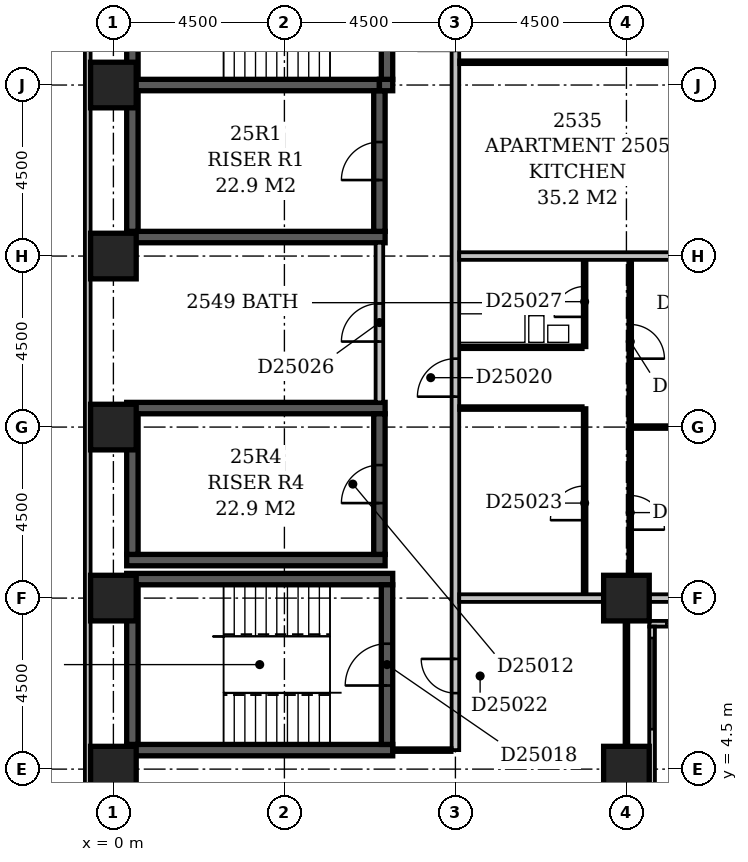
"""IFC4 building model, lengths in metres.
Left out: names, types, materials, properties, quantities, classifications, styles, units other than length and angle.
Written with IfcOpenShell. Run it as: python <this file> out.ifc"""

import sys

from ifc_helpers import new_model, si_unit, direction, frame, frame_2d, origin, origin_2d, place, context, subcontext, project, spatial, rectangle, extrude, element, fill, save


model = new_model("IFC4")
c1 = context("Model", 3, precision=1e-05, world=origin(), true_north=direction((0.0, 1.0)))
c2 = subcontext(c1, "Body", "Model", "MODEL_VIEW")
j1 = project(units=[si_unit("LENGTHUNIT", "METRE"), si_unit("PLANEANGLEUNIT", "RADIAN")], contexts=[c1])
p1 = place(None, origin())
s1 = spatial("IfcSite", under=j1, at=p1, CompositionType="ELEMENT")
p2 = place(p1, origin())
s2 = spatial("IfcBuilding", under=s1, at=p2, CompositionType="ELEMENT")
p3 = place(p2, frame((0.0, 0.0, 101.0)))
s3 = spatial("IfcBuildingStorey", under=s2, at=p3, CompositionType="ELEMENT", Elevation=101.0)
for number, where, z_axis, x_axis in (
    (1, (0.35, 5.0, -0.3), (0.0, 0.0, 1.0), (1.0, 0.0, 0.0)),
    (2, (0.35, 9.5, -0.3), (0.0, 0.0, 1.0), (1.0, 0.0, 0.0)),
):
    element("IfcWall", number, at=place(p3, frame(where, z_axis=z_axis, x_axis=x_axis)), inside=s3, PredefinedType="SHEAR", context=c2, shape_type="SweptSolid", body=[
        extrude(rectangle(XDim=7.0, YDim=0.3, at=frame_2d((3.5, 0.0))), origin(), (0.0, 0.0, 1.0), 3.6),
    ])
for number, where, z_axis, x_axis in (
    (3, (0.35, 10.0, -0.3), (0.0, 0.0, 1.0), (1.0, 0.0, 0.0)),
    (4, (0.35, 14.0, -0.3), (0.0, 0.0, 1.0), (1.0, 0.0, 0.0)),
    (5, (0.35, 18.5, -0.3), (0.0, 0.0, 1.0), (1.0, 0.0, 0.0)),
):
    element("IfcWall", number, at=place(p3, frame(where, z_axis=z_axis, x_axis=x_axis)), inside=s3, PredefinedType="SHEAR", context=c2, shape_type="SweptSolid", body=[
        extrude(rectangle(XDim=6.8, YDim=0.3, at=frame_2d((3.4, 0.0))), origin(), (0.0, 0.0, 1.0), 3.6),
    ])
p4 = place(p3, frame((0.35, 22.5, -0.3), z_axis=(0.0, 0.0, 1.0), x_axis=(1.0, 0.0, 0.0)))
e6 = element("IfcWall", 6, at=p4, inside=s3, PredefinedType="SHEAR", context=c2, shape_type="SweptSolid", body=[
    extrude(rectangle(XDim=6.65, YDim=0.3, at=frame_2d((3.325, 0.0))), origin(), (0.0, 0.0, 1.0), 3.6),
])
p5 = place(p3, frame((0.5, 5.15, -0.3), z_axis=(0.0, 0.0, 1.0), x_axis=(0.0, 1.0, 0.0)))
e7 = element("IfcWall", 7, at=p5, inside=s3, PredefinedType="SHEAR", context=c2, shape_type="SweptSolid", body=[
    extrude(rectangle(XDim=4.2, YDim=0.3, at=frame_2d((2.1, 0.0))), origin(), (0.0, 0.0, 1.0), 3.6),
])
for number, where, z_axis, x_axis in (
    (8, (0.5, 10.15, -0.3), (0.0, 0.0, 1.0), (0.0, 1.0, 0.0)),
    (9, (0.5, 18.65, -0.3), (0.0, 0.0, 1.0), (0.0, 1.0, 0.0)),
):
    element("IfcWall", number, at=place(p3, frame(where, z_axis=z_axis, x_axis=x_axis)), inside=s3, PredefinedType="SHEAR", context=c2, shape_type="SweptSolid", body=[
        extrude(rectangle(XDim=3.7, YDim=0.3, at=frame_2d((1.85, 0.0))), origin(), (0.0, 0.0, 1.0), 3.6),
    ])
p6 = place(p3, frame((0.5, 22.65, -0.3), z_axis=(0.0, 0.0, 1.0), x_axis=(0.0, 1.0, 0.0)))
e10 = element("IfcWall", 10, at=p6, inside=s3, PredefinedType="SHEAR", context=c2, shape_type="SweptSolid", body=[
    extrude(rectangle(XDim=4.2, YDim=0.3, at=frame_2d((2.1, 0.0))), origin(), (0.0, 0.0, 1.0), 3.6),
])
p7 = place(p3, frame((7.0, 10.15, -0.3), z_axis=(0.0, 0.0, 1.0), x_axis=(0.0, 1.0, 0.0)))
e11 = element("IfcWall", 11, at=p7, inside=s3, PredefinedType="SHEAR", context=c2, shape_type="SweptSolid", body=[
    extrude(rectangle(XDim=3.7, YDim=0.3, at=frame_2d((1.85, 0.0))), origin(), (0.0, 0.0, 1.0), 3.6),
])
p8 = place(p7, frame((1.35, 0.0, 0.3)))
e12 = element("IfcOpeningElement", 12, at=p8, cuts=e11, PredefinedType="OPENING", context=c2, shape_type="SweptSolid", body=[
    extrude(rectangle(XDim=1.0, YDim=2.1, at=frame_2d((0.5, 1.05))), frame((0.0, 0.162, 0.0), z_axis=(0.0, -1.0, 0.0), x_axis=(1.0, 0.0, 0.0)), (0.0, 0.0, 1.0), 0.324),
])
p9 = place(p3, frame((7.0, 18.65, -0.3), z_axis=(0.0, 0.0, 1.0), x_axis=(0.0, 1.0, 0.0)))
e13 = element("IfcWall", 13, at=p9, inside=s3, PredefinedType="SHEAR", context=c2, shape_type="SweptSolid", body=[
    extrude(rectangle(XDim=3.7, YDim=0.3, at=frame_2d((1.85, 0.0))), origin(), (0.0, 0.0, 1.0), 3.6),
])
p10 = place(p9, frame((1.35, 0.0, 0.3)))
e14 = element("IfcOpeningElement", 14, at=p10, cuts=e13, PredefinedType="OPENING", context=c2, shape_type="SweptSolid", body=[
    extrude(rectangle(XDim=1.0, YDim=2.1, at=frame_2d((0.5, 1.05))), frame((0.0, 0.162, 0.0), z_axis=(0.0, -1.0, 0.0), x_axis=(1.0, 0.0, 0.0)), (0.0, 0.0, 1.0), 0.324),
])
p11 = place(p3, frame((7.0, 22.5, -0.3), z_axis=(0.0, 0.0, 1.0), x_axis=(1.0, 0.0, 0.0)))
e15 = element("IfcWall", 15, at=p11, inside=s3, PredefinedType="SHEAR", context=c2, shape_type="SweptSolid", body=[
    extrude(rectangle(XDim=0.35, YDim=0.3, at=frame_2d((0.175, 0.0))), origin(), (0.0, 0.0, 1.0), 3.6),
])
p12 = place(p3, frame((7.2, 5.15, -0.3), z_axis=(0.0, 0.0, 1.0), x_axis=(0.0, 1.0, 0.0)))
e16 = element("IfcWall", 16, at=p12, inside=s3, PredefinedType="SHEAR", context=c2, shape_type="SweptSolid", body=[
    extrude(rectangle(XDim=4.2, YDim=0.3, at=frame_2d((2.1, 0.0))), origin(), (0.0, 0.0, 1.0), 3.6),
])
p13 = place(p12, frame((1.55, 0.0, 0.3)))
e17 = element("IfcOpeningElement", 17, at=p13, cuts=e16, PredefinedType="OPENING", context=c2, shape_type="SweptSolid", body=[
    extrude(rectangle(XDim=1.1, YDim=2.1, at=frame_2d((0.55, 1.05))), frame((0.0, 0.162, 0.0), z_axis=(0.0, -1.0, 0.0), x_axis=(1.0, 0.0, 0.0)), (0.0, 0.0, 1.0), 0.324),
])
p14 = place(p3, frame((7.2, 22.65, -0.3), z_axis=(0.0, 0.0, 1.0), x_axis=(0.0, 1.0, 0.0)))
e18 = element("IfcWall", 18, at=p14, inside=s3, PredefinedType="SHEAR", context=c2, shape_type="SweptSolid", body=[
    extrude(rectangle(XDim=4.2, YDim=0.3, at=frame_2d((2.1, 0.0))), origin(), (0.0, 0.0, 1.0), 3.6),
])
p15 = place(p14, frame((0.8, 0.0, 0.3)))
e19 = element("IfcOpeningElement", 19, at=p15, cuts=e18, PredefinedType="OPENING", context=c2, shape_type="SweptSolid", body=[
    extrude(rectangle(XDim=1.1, YDim=2.1, at=frame_2d((0.55, 1.05))), frame((0.0, 0.162, 0.0), z_axis=(0.0, -1.0, 0.0), x_axis=(1.0, 0.0, 0.0)), (0.0, 0.0, 1.0), 0.324),
])
for number, where, z_axis, x_axis in (
    (20, (0.0, 4.5, -0.3), (0.0, 0.0, 1.0), (1.0, 0.0, 0.0)),
    (21, (13.5, 4.5, -0.3), (0.0, 0.0, 1.0), (1.0, 0.0, 0.0)),
    (22, (0.0, 9.0, -0.3), (0.0, 0.0, 1.0), (1.0, 0.0, 0.0)),
    (23, (13.5, 9.0, -0.3), (0.0, 0.0, 1.0), (1.0, 0.0, 0.0)),
    (24, (0.0, 13.5, -0.3), (0.0, 0.0, 1.0), (1.0, 0.0, 0.0)),
    (25, (0.0, 18.0, -0.3), (0.0, 0.0, 1.0), (1.0, 0.0, 0.0)),
    (26, (0.0, 22.5, -0.3), (0.0, 0.0, 1.0), (1.0, 0.0, 0.0)),
):
    element("IfcColumn", number, at=place(p3, frame(where, z_axis=z_axis, x_axis=x_axis)), inside=s3, PredefinedType="COLUMN", context=c2, shape_type="SweptSolid", body=[
        extrude(rectangle(XDim=1.2, YDim=1.2, at=origin_2d()), origin(), (0.0, 0.0, 1.0), 3.6),
    ])
p16 = place(p3, frame((14.175, 3.9, 0.0), z_axis=(0.0, 0.0, 1.0), x_axis=(0.0, 1.0, 0.0)))
e27 = element("IfcWall", 27, at=p16, inside=s3, PredefinedType="STANDARD", context=c2, shape_type="SweptSolid", body=[
    extrude(rectangle(XDim=4.35, YDim=0.15, at=frame_2d((2.175, 0.0))), origin(), (0.0, 0.0, 1.0), 2.7),
])
p17 = place(p16, frame((1.65, 0.0, 0.6)))
e28 = element("IfcOpeningElement", 28, at=p17, cuts=e27, PredefinedType="OPENING", context=c2, shape_type="SweptSolid", body=[
    extrude(rectangle(XDim=2.4, YDim=1.8, at=frame_2d((1.2, 0.9))), frame((0.0, 0.087, 0.0), z_axis=(0.0, -1.0, 0.0), x_axis=(1.0, 0.0, 0.0)), (0.0, 0.0, 1.0), 0.174),
])
p18 = place(p3, frame((14.1, 8.325, 0.0), z_axis=(0.0, 0.0, 1.0), x_axis=(1.0, 0.0, 0.0)))
e29 = element("IfcWall", 29, at=p18, inside=s3, PredefinedType="STANDARD", context=c2, shape_type="SweptSolid", body=[
    extrude(rectangle(XDim=4.65, YDim=0.15, at=frame_2d((2.325, 0.0))), origin(), (0.0, 0.0, 1.0), 2.7),
])
p19 = place(p18, frame((0.45, 0.0, 0.6)))
e30 = element("IfcOpeningElement", 30, at=p19, cuts=e29, PredefinedType="OPENING", context=c2, shape_type="SweptSolid", body=[
    extrude(rectangle(XDim=2.4, YDim=1.8, at=frame_2d((1.2, 0.9))), frame((0.0, 0.087, 0.0), z_axis=(0.0, -1.0, 0.0), x_axis=(1.0, 0.0, 0.0)), (0.0, 0.0, 1.0), 0.174),
])
p20 = place(p3, frame((-0.675, 59.1, 0.0), z_axis=(0.0, 0.0, 1.0), x_axis=(0.0, -1.0, 0.0)))
e31 = element("IfcWall", 31, at=p20, inside=s3, PredefinedType="STANDARD", context=c2, shape_type="SweptSolid", body=[
    extrude(rectangle(XDim=55.35, YDim=0.15, at=frame_2d((27.675, 0.0))), origin(), (0.0, 0.0, 1.0), 2.7),
])
p21 = place(p20, frame((10.65, 0.0, 0.6)))
e32 = element("IfcOpeningElement", 32, at=p21, cuts=e31, PredefinedType="OPENING", context=c2, shape_type="SweptSolid", body=[
    extrude(rectangle(XDim=2.4, YDim=1.8, at=frame_2d((1.2, 0.9))), frame((0.0, 0.087, 0.0), z_axis=(0.0, -1.0, 0.0), x_axis=(1.0, 0.0, 0.0)), (0.0, 0.0, 1.0), 0.174),
])
p22 = place(p20, frame((15.15, 0.0, 0.6)))
e33 = element("IfcOpeningElement", 33, at=p22, cuts=e31, PredefinedType="OPENING", context=c2, shape_type="SweptSolid", body=[
    extrude(rectangle(XDim=2.4, YDim=1.8, at=frame_2d((1.2, 0.9))), frame((0.0, 0.087, 0.0), z_axis=(0.0, -1.0, 0.0), x_axis=(1.0, 0.0, 0.0)), (0.0, 0.0, 1.0), 0.174),
])
p23 = place(p20, frame((19.476, 0.0, 0.6)))
e34 = element("IfcOpeningElement", 34, at=p23, cuts=e31, PredefinedType="OPENING", context=c2, shape_type="SweptSolid", body=[
    extrude(rectangle(XDim=2.4, YDim=1.8, at=frame_2d((1.2, 0.9))), frame((0.0, 0.087, 0.0), z_axis=(0.0, -1.0, 0.0), x_axis=(1.0, 0.0, 0.0)), (0.0, 0.0, 1.0), 0.174),
])
p24 = place(p3, frame((0.0, 4.4, 0.0), z_axis=(0.0, 0.0, 1.0), x_axis=(0.0, 1.0, 0.0)))
e35 = element("IfcWall", 35, at=p24, inside=s3, PredefinedType="PARTITIONING", context=c2, shape_type="SweptSolid", body=[
    extrude(rectangle(XDim=0.7, YDim=0.1, at=frame_2d((0.35, 0.0))), origin(), (0.0, 0.0, 1.0), 2.7),
])
p25 = place(p3, frame((7.349, 5.0, 0.0), z_axis=(0.0, 0.0, 1.0), x_axis=(1.0, 0.0, 0.0)))
e36 = element("IfcWall", 36, at=p25, inside=s3, PredefinedType="PARTITIONING", context=c2, shape_type="SweptSolid", body=[
    extrude(rectangle(XDim=1.551, YDim=0.1, at=frame_2d((0.775, 0.0))), origin(), (0.0, 0.0, 1.0), 3.3),
])
p26 = place(p3, frame((9.0, 5.0, 0.0), z_axis=(0.0, 0.0, 1.0), x_axis=(0.0, 1.0, 0.0)))
e37 = element("IfcWall", 37, at=p26, inside=s3, PredefinedType="PARTITIONING", context=c2, shape_type="SweptSolid", body=[
    extrude(rectangle(XDim=44.5, YDim=0.2, at=frame_2d((22.25, 0.0))), origin(), (0.0, 0.0, 1.0), 3.3),
])
p27 = place(p26, frame((18.4, 0.0, 0.0)))
e38 = element("IfcOpeningElement", 38, at=p27, cuts=e37, PredefinedType="OPENING", context=c2, shape_type="SweptSolid", body=[
    extrude(rectangle(XDim=1.0, YDim=2.1, at=frame_2d((0.5, 1.05))), frame((0.0, 0.112, 0.0), z_axis=(0.0, -1.0, 0.0), x_axis=(1.0, 0.0, 0.0)), (0.0, 0.0, 1.0), 0.224),
])
p28 = place(p26, frame((9.3, 0.0, 0.0)))
e39 = element("IfcOpeningElement", 39, at=p28, cuts=e37, PredefinedType="OPENING", context=c2, shape_type="SweptSolid", body=[
    extrude(rectangle(XDim=1.0, YDim=2.1, at=frame_2d((0.5, 1.05))), frame((0.0, 0.112, 0.0), z_axis=(0.0, -1.0, 0.0), x_axis=(1.0, 0.0, 0.0)), (0.0, 0.0, 1.0), 0.224),
])
p29 = place(p26, frame((37.25, 0.0, 0.0)))
e40 = element("IfcOpeningElement", 40, at=p29, cuts=e37, PredefinedType="OPENING", context=c2, shape_type="SweptSolid", body=[
    extrude(rectangle(XDim=0.9, YDim=2.1, at=frame_2d((0.45, 1.05))), frame((0.0, 0.112, 0.0), z_axis=(0.0, -1.0, 0.0), x_axis=(1.0, 0.0, 0.0)), (0.0, 0.0, 1.0), 0.224),
])
p30 = place(p26, frame((1.5, 0.0, 0.0)))
e41 = element("IfcOpeningElement", 41, at=p30, cuts=e37, PredefinedType="OPENING", context=c2, shape_type="SweptSolid", body=[
    extrude(rectangle(XDim=0.9, YDim=2.1, at=frame_2d((0.45, 1.05))), frame((0.0, 0.112, 0.0), z_axis=(0.0, -1.0, 0.0), x_axis=(1.0, 0.0, 0.0)), (0.0, 0.0, 1.0), 0.224),
])
p31 = place(p3, frame((13.5, 5.1, 0.0), z_axis=(0.0, 0.0, 1.0), x_axis=(0.0, 1.0, 0.0)))
e42 = element("IfcWall", 42, at=p31, inside=s3, PredefinedType="PARTITIONING", context=c2, shape_type="SweptSolid", body=[
    extrude(rectangle(XDim=3.3, YDim=0.1, at=frame_2d((1.65, 0.0))), origin(), (0.0, 0.0, 1.0), 2.7),
])
p32 = place(p3, frame((9.1, 9.0, 0.0), z_axis=(0.0, 0.0, 1.0), x_axis=(1.0, 0.0, 0.0)))
e43 = element("IfcWall", 43, at=p32, inside=s3, PredefinedType="PARTITIONING", context=c2, shape_type="SweptSolid", body=[
    extrude(rectangle(XDim=3.8, YDim=0.2, at=frame_2d((1.9, 0.0))), origin(), (0.0, 0.0, 1.0), 3.3),
])
p33 = place(p3, frame((14.1, 9.0, 0.0), z_axis=(0.0, 0.0, 1.0), x_axis=(1.0, 0.0, 0.0)))
e44 = element("IfcWall", 44, at=p33, inside=s3, PredefinedType="PARTITIONING", context=c2, shape_type="SweptSolid", body=[
    extrude(rectangle(XDim=3.3, YDim=0.2, at=frame_2d((1.65, 0.0))), origin(), (0.0, 0.0, 1.0), 2.7),
])
p34 = place(p3, frame((12.4, 9.1, 0.0), z_axis=(0.0, 0.0, 1.0), x_axis=(0.0, 1.0, 0.0)))
e45 = element("IfcWall", 45, at=p34, inside=s3, PredefinedType="PARTITIONING", context=c2, shape_type="SweptSolid", body=[
    extrude(rectangle(XDim=4.9, YDim=0.1, at=frame_2d((2.45, 0.0))), origin(), (0.0, 0.0, 1.0), 3.3),
])
p35 = place(p34, frame((1.95, 0.0, 0.0)))
e46 = element("IfcOpeningElement", 46, at=p35, cuts=e45, PredefinedType="OPENING", context=c2, shape_type="SweptSolid", body=[
    extrude(rectangle(XDim=0.9, YDim=2.1, at=frame_2d((0.45, 1.05))), frame((0.0, 0.062, 0.0), z_axis=(0.0, -1.0, 0.0), x_axis=(1.0, 0.0, 0.0)), (0.0, 0.0, 1.0), 0.124),
])
p36 = place(p3, frame((13.6, 9.6, 0.0), z_axis=(0.0, 0.0, 1.0), x_axis=(0.0, 1.0, 0.0)))
e47 = element("IfcWall", 47, at=p36, inside=s3, PredefinedType="PARTITIONING", context=c2, shape_type="SweptSolid", body=[
    extrude(rectangle(XDim=8.3, YDim=0.1, at=frame_2d((4.15, 0.0))), origin(), (0.0, 0.0, 1.0), 3.3),
])
p37 = place(p36, frame((1.2, 0.0, 0.0)))
e48 = element("IfcOpeningElement", 48, at=p37, cuts=e47, PredefinedType="OPENING", context=c2, shape_type="SweptSolid", body=[
    extrude(rectangle(XDim=0.9, YDim=2.1, at=frame_2d((0.45, 1.05))), frame((0.0, 0.062, 0.0), z_axis=(0.0, -1.0, 0.0), x_axis=(1.0, 0.0, 0.0)), (0.0, 0.0, 1.0), 0.124),
])
p38 = place(p36, frame((5.7, 0.0, 0.0)))
e49 = element("IfcOpeningElement", 49, at=p38, cuts=e47, PredefinedType="OPENING", context=c2, shape_type="SweptSolid", body=[
    extrude(rectangle(XDim=0.9, YDim=2.1, at=frame_2d((0.45, 1.05))), frame((0.0, 0.062, 0.0), z_axis=(0.0, -1.0, 0.0), x_axis=(1.0, 0.0, 0.0)), (0.0, 0.0, 1.0), 0.124),
])
p39 = place(p3, frame((13.65, 13.5, 0.0), z_axis=(0.0, 0.0, 1.0), x_axis=(1.0, 0.0, 0.0)))
e50 = element("IfcWall", 50, at=p39, inside=s3, PredefinedType="PARTITIONING", context=c2, shape_type="SweptSolid", body=[
    extrude(rectangle(XDim=3.75, YDim=0.1, at=frame_2d((1.875, 0.0))), origin(), (0.0, 0.0, 1.0), 3.3),
])
p40 = place(p3, frame((9.1, 14.0, 0.0), z_axis=(0.0, 0.0, 1.0), x_axis=(1.0, 0.0, 0.0)))
e51 = element("IfcWall", 51, at=p40, inside=s3, PredefinedType="PARTITIONING", context=c2, shape_type="SweptSolid", body=[
    extrude(rectangle(XDim=3.25, YDim=0.1, at=frame_2d((1.625, 0.0))), origin(), (0.0, 0.0, 1.0), 3.3),
])
p41 = place(p3, frame((7.0, 14.15, 0.0), z_axis=(0.0, 0.0, 1.0), x_axis=(0.0, 1.0, 0.0)))
e52 = element("IfcWall", 52, at=p41, inside=s3, PredefinedType="PARTITIONING", context=c2, shape_type="SweptSolid", body=[
    extrude(rectangle(XDim=4.2, YDim=0.2, at=frame_2d((2.1, 0.0))), origin(), (0.0, 0.0, 1.0), 3.3),
])
p42 = place(p41, frame((1.6, 0.0, 0.0)))
e53 = element("IfcOpeningElement", 53, at=p42, cuts=e52, PredefinedType="OPENING", context=c2, shape_type="SweptSolid", body=[
    extrude(rectangle(XDim=1.0, YDim=2.1, at=frame_2d((0.5, 1.05))), frame((0.0, 0.112, 0.0), z_axis=(0.0, -1.0, 0.0), x_axis=(1.0, 0.0, 0.0)), (0.0, 0.0, 1.0), 0.224),
])
p43 = place(p3, frame((9.1, 15.6, 0.0), z_axis=(0.0, 0.0, 1.0), x_axis=(1.0, 0.0, 0.0)))
e54 = element("IfcWall", 54, at=p43, inside=s3, PredefinedType="PLUMBINGWALL", context=c2, shape_type="SweptSolid", body=[
    extrude(rectangle(XDim=3.25, YDim=0.1, at=frame_2d((1.625, 0.0))), origin(), (0.0, 0.0, 1.0), 3.3),
])
p44 = place(p3, frame((12.4, 15.6, 0.0), z_axis=(0.0, 0.0, 1.0), x_axis=(0.0, 1.0, 0.0)))
e55 = element("IfcWall", 55, at=p44, inside=s3, PredefinedType="PARTITIONING", context=c2, shape_type="SweptSolid", body=[
    extrude(rectangle(XDim=2.3, YDim=0.1, at=frame_2d((1.15, 0.0))), origin(), (0.0, 0.0, 1.0), 3.3),
])
p45 = place(p44, frame((0.8, 0.0, 0.0)))
e56 = element("IfcOpeningElement", 56, at=p45, cuts=e55, PredefinedType="OPENING", context=c2, shape_type="SweptSolid", body=[
    extrude(rectangle(XDim=0.8, YDim=2.1, at=frame_2d((0.4, 1.05))), frame((0.0, 0.062, 0.0), z_axis=(0.0, -1.0, 0.0), x_axis=(1.0, 0.0, 0.0)), (0.0, 0.0, 1.0), 0.124),
])
p46 = place(p3, frame((9.1, 18.0, 0.0), z_axis=(0.0, 0.0, 1.0), x_axis=(1.0, 0.0, 0.0)))
e57 = element("IfcWall", 57, at=p46, inside=s3, PredefinedType="PARTITIONING", context=c2, shape_type="SweptSolid", body=[
    extrude(rectangle(XDim=8.3, YDim=0.2, at=frame_2d((4.15, 0.0))), origin(), (0.0, 0.0, 1.0), 2.6),
])
p47 = place(p3, frame((9.1, 23.1, 0.0), z_axis=(0.0, 0.0, 1.0), x_axis=(1.0, 0.0, 0.0)))
e58 = element("IfcWall", 58, at=p47, inside=s3, PredefinedType="PARTITIONING", context=c2, shape_type="SweptSolid", body=[
    extrude(rectangle(XDim=6.75, YDim=0.1, at=frame_2d((3.375, 0.0))), origin(), (0.0, 0.0, 1.0), 3.3),
])
p48 = place(p17, origin())
e59 = element("IfcWindow", 59, at=p48, inside=s3, PartitioningType="SINGLE_PANEL", PredefinedType="WINDOW", context=c2, shape_type="SweptSolid", body=[
    extrude(rectangle(XDim=2.4, YDim=1.8, at=frame_2d((1.2, 0.9))), frame((0.0, 0.03, 0.0), z_axis=(0.0, -1.0, 0.0), x_axis=(1.0, 0.0, 0.0)), (0.0, 0.0, 1.0), 0.06),
])
fill(e28, e59)
p49 = place(p19, origin())
e60 = element("IfcWindow", 60, at=p49, inside=s3, PartitioningType="SINGLE_PANEL", PredefinedType="WINDOW", context=c2, shape_type="SweptSolid", body=[
    extrude(rectangle(XDim=2.4, YDim=1.8, at=frame_2d((1.2, 0.9))), frame((0.0, 0.03, 0.0), z_axis=(0.0, -1.0, 0.0), x_axis=(1.0, 0.0, 0.0)), (0.0, 0.0, 1.0), 0.06),
])
fill(e30, e60)
p50 = place(p10, origin())
e61 = element("IfcDoor", 61, at=p50, inside=s3, OperationType="SINGLE_SWING_LEFT", PredefinedType="DOOR", context=c2, shape_type="SweptSolid", body=[
    extrude(rectangle(XDim=1.0, YDim=2.1, at=frame_2d((0.5, 1.05))), frame((0.0, 0.025, 0.0), z_axis=(0.0, -1.0, 0.0), x_axis=(1.0, 0.0, 0.0)), (0.0, 0.0, 1.0), 0.05),
])
fill(e14, e61)
p51 = place(p8, origin())
e62 = element("IfcDoor", 62, at=p51, inside=s3, OperationType="SINGLE_SWING_LEFT", PredefinedType="DOOR", context=c2, shape_type="SweptSolid", body=[
    extrude(rectangle(XDim=1.0, YDim=2.1, at=frame_2d((0.5, 1.05))), frame((0.0, 0.025, 0.0), z_axis=(0.0, -1.0, 0.0), x_axis=(1.0, 0.0, 0.0)), (0.0, 0.0, 1.0), 0.05),
])
fill(e12, e62)
p52 = place(p13, origin())
e63 = element("IfcDoor", 63, at=p52, inside=s3, OperationType="SINGLE_SWING_LEFT", PredefinedType="DOOR", context=c2, shape_type="SweptSolid", body=[
    extrude(rectangle(XDim=1.1, YDim=2.1, at=frame_2d((0.55, 1.05))), frame((0.0, 0.025, 0.0), z_axis=(0.0, -1.0, 0.0), x_axis=(1.0, 0.0, 0.0)), (0.0, 0.0, 1.0), 0.05),
])
fill(e17, e63)
p53 = place(p28, origin())
e64 = element("IfcDoor", 64, at=p53, inside=s3, OperationType="SINGLE_SWING_LEFT", PredefinedType="DOOR", context=c2, shape_type="SweptSolid", body=[
    extrude(rectangle(XDim=1.0, YDim=2.1, at=frame_2d((0.5, 1.05))), frame((0.0, 0.025, 0.0), z_axis=(0.0, -1.0, 0.0), x_axis=(1.0, 0.0, 0.0)), (0.0, 0.0, 1.0), 0.05),
])
fill(e39, e64)
p54 = place(p30, frame((0.9, 0.0, 0.0), z_axis=(0.0, 0.0, 1.0), x_axis=(-1.0, 0.0, 0.0)))
e65 = element("IfcDoor", 65, at=p54, inside=s3, OperationType="SINGLE_SWING_LEFT", PredefinedType="DOOR", context=c2, shape_type="SweptSolid", body=[
    extrude(rectangle(XDim=0.9, YDim=2.1, at=frame_2d((0.45, 1.05))), frame((0.0, 0.025, 0.0), z_axis=(0.0, -1.0, 0.0), x_axis=(1.0, 0.0, 0.0)), (0.0, 0.0, 1.0), 0.05),
])
fill(e41, e65)
p55 = place(p35, origin())
e66 = element("IfcDoor", 66, at=p55, inside=s3, OperationType="SINGLE_SWING_LEFT", PredefinedType="DOOR", context=c2, shape_type="SweptSolid", body=[
    extrude(rectangle(XDim=0.9, YDim=2.1, at=frame_2d((0.45, 1.05))), frame((0.0, 0.025, 0.0), z_axis=(0.0, -1.0, 0.0), x_axis=(1.0, 0.0, 0.0)), (0.0, 0.0, 1.0), 0.05),
])
fill(e46, e66)
p56 = place(p37, frame((0.9, 0.0, 0.0), z_axis=(0.0, 0.0, 1.0), x_axis=(-1.0, 0.0, 0.0)))
e67 = element("IfcDoor", 67, at=p56, inside=s3, OperationType="SINGLE_SWING_RIGHT", PredefinedType="DOOR", context=c2, shape_type="SweptSolid", body=[
    extrude(rectangle(XDim=0.9, YDim=2.1, at=frame_2d((0.45, 1.05))), frame((0.0, 0.025, 0.0), z_axis=(0.0, -1.0, 0.0), x_axis=(1.0, 0.0, 0.0)), (0.0, 0.0, 1.0), 0.05),
])
fill(e48, e67)
p57 = place(p38, frame((0.9, 0.0, 0.0), z_axis=(0.0, 0.0, 1.0), x_axis=(-1.0, 0.0, 0.0)))
e68 = element("IfcDoor", 68, at=p57, inside=s3, OperationType="SINGLE_SWING_RIGHT", PredefinedType="DOOR", context=c2, shape_type="SweptSolid", body=[
    extrude(rectangle(XDim=0.9, YDim=2.1, at=frame_2d((0.45, 1.05))), frame((0.0, 0.025, 0.0), z_axis=(0.0, -1.0, 0.0), x_axis=(1.0, 0.0, 0.0)), (0.0, 0.0, 1.0), 0.05),
])
fill(e49, e68)
p58 = place(p42, origin())
e69 = element("IfcDoor", 69, at=p58, inside=s3, OperationType="SINGLE_SWING_LEFT", PredefinedType="DOOR", context=c2, shape_type="SweptSolid", body=[
    extrude(rectangle(XDim=1.0, YDim=2.1, at=frame_2d((0.5, 1.05))), frame((0.0, 0.025, 0.0), z_axis=(0.0, -1.0, 0.0), x_axis=(1.0, 0.0, 0.0)), (0.0, 0.0, 1.0), 0.05),
])
fill(e53, e69)
p59 = place(p45, origin())
e70 = element("IfcDoor", 70, at=p59, inside=s3, OperationType="SINGLE_SWING_LEFT", PredefinedType="DOOR", context=c2, shape_type="SweptSolid", body=[
    extrude(rectangle(XDim=0.8, YDim=2.1, at=frame_2d((0.4, 1.05))), frame((0.0, 0.025, 0.0), z_axis=(0.0, -1.0, 0.0), x_axis=(1.0, 0.0, 0.0)), (0.0, 0.0, 1.0), 0.05),
])
fill(e56, e70)
save(model, sys.argv[1])
